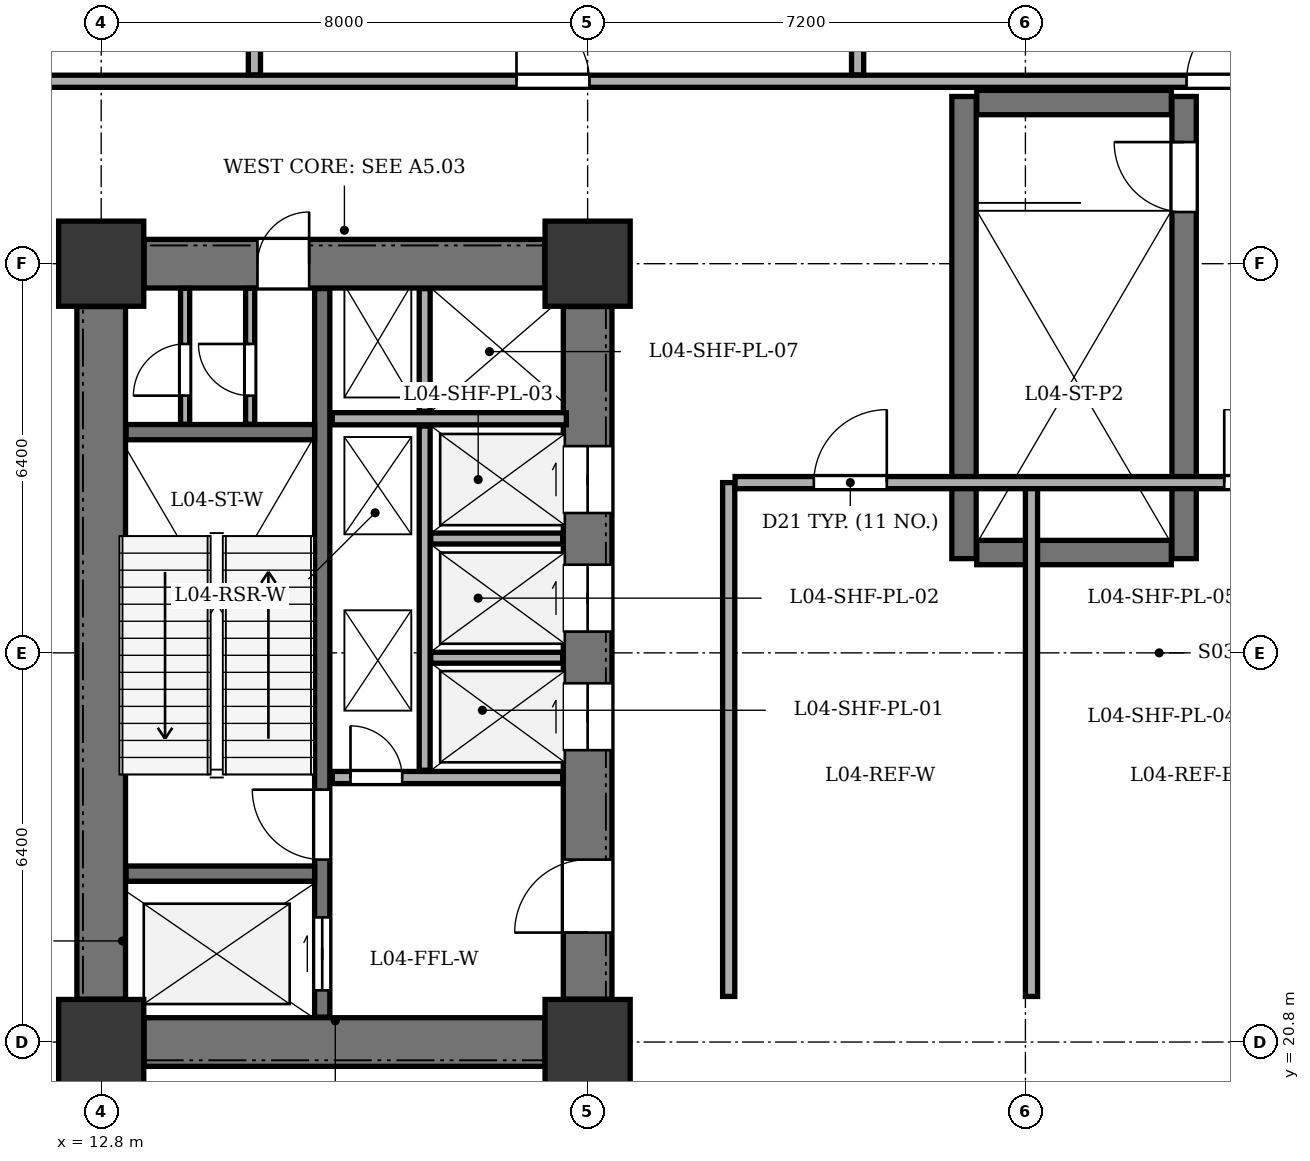
"""IFC4 building model, lengths in metres.
Left out: names, types, materials, properties, quantities, classifications, styles, units other than length and angle.
Written with IfcOpenShell. Run it as: python <this file> out.ifc"""

import sys

from ifc_helpers import new_model, si_unit, direction, frame, frame_2d, origin, origin_2d, place, context, subcontext, project, spatial, rectangle, extrude, element, fill, save


model = new_model("IFC4")
c1 = context("Model", 3, precision=1e-05, world=origin(), true_north=direction((0.0, 1.0)))
c2 = subcontext(c1, "Body", "Model", "MODEL_VIEW")
j1 = project(units=[si_unit("LENGTHUNIT", "METRE"), si_unit("PLANEANGLEUNIT", "RADIAN")], contexts=[c1])
p1 = place(None, origin())
s1 = spatial("IfcSite", under=j1, at=p1, CompositionType="ELEMENT")
p2 = place(p1, origin())
s2 = spatial("IfcBuilding", under=s1, at=p2, CompositionType="ELEMENT")
p3 = place(p2, frame((0.0, 0.0, 18.9)))
s3 = spatial("IfcBuildingStorey", under=s2, at=p3, CompositionType="ELEMENT", Elevation=18.9)
for number, where, z_axis, x_axis in (
    (1, (12.8, 20.8, 0.0), (0.0, 0.0, 1.0), (1.0, 0.0, 0.0)),
    (2, (20.8, 20.8, 0.0), (0.0, 0.0, 1.0), (1.0, 0.0, 0.0)),
    (3, (12.8, 33.6, 0.0), (0.0, 0.0, 1.0), (1.0, 0.0, 0.0)),
    (4, (20.8, 33.6, 0.0), (0.0, 0.0, 1.0), (1.0, 0.0, 0.0)),
):
    element("IfcColumn", number, at=place(p3, frame(where, z_axis=z_axis, x_axis=x_axis)), inside=s3, PredefinedType="COLUMN", context=c2, shape_type="SweptSolid", body=[
        extrude(rectangle(XDim=1.4, YDim=1.4, at=origin_2d()), origin(), (0.0, 0.0, 1.0), 5.4),
    ])
p4 = place(p3, frame((12.8, 21.505, 0.0), z_axis=(0.0, 0.0, 1.0), x_axis=(0.0, 1.0, 0.0)))
e5 = element("IfcWall", 5, at=p4, inside=s3, PredefinedType="SHEAR", context=c2, shape_type="SweptSolid", body=[
    extrude(rectangle(XDim=11.39, YDim=0.8, at=frame_2d((5.695, 0.0))), origin(), (0.0, 0.0, 1.0), 4.95),
])
p5 = place(p3, frame((13.505, 20.8, 0.0), z_axis=(0.0, 0.0, 1.0), x_axis=(1.0, 0.0, 0.0)))
e6 = element("IfcWall", 6, at=p5, inside=s3, PredefinedType="SHEAR", context=c2, shape_type="SweptSolid", body=[
    extrude(rectangle(XDim=6.59, YDim=0.8, at=frame_2d((3.295, 0.0))), origin(), (0.0, 0.0, 1.0), 4.95),
])
p6 = place(p3, frame((13.505, 33.6, 0.0), z_axis=(0.0, 0.0, 1.0), x_axis=(1.0, 0.0, 0.0)))
e7 = element("IfcWall", 7, at=p6, inside=s3, PredefinedType="SHEAR", context=c2, shape_type="SweptSolid", body=[
    extrude(rectangle(XDim=6.59, YDim=0.8, at=frame_2d((3.295, 0.0))), origin(), (0.0, 0.0, 1.0), 4.95),
])
p7 = place(p6, frame((1.865, 0.0, 0.0)))
e8 = element("IfcOpeningElement", 8, at=p7, cuts=e7, PredefinedType="OPENING", context=c2, shape_type="SweptSolid", body=[
    extrude(rectangle(XDim=0.85, YDim=2.02, at=frame_2d((0.425, 1.01))), frame((0.0, 0.41, 0.0), z_axis=(0.0, -1.0, 0.0), x_axis=(1.0, 0.0, 0.0)), (0.0, 0.0, 1.0), 0.82),
])
p8 = place(p3, frame((20.8, 21.505, 0.0), z_axis=(0.0, 0.0, 1.0), x_axis=(0.0, 1.0, 0.0)))
e9 = element("IfcWall", 9, at=p8, inside=s3, PredefinedType="SHEAR", context=c2, shape_type="SweptSolid", body=[
    extrude(rectangle(XDim=11.39, YDim=0.8, at=frame_2d((5.695, 0.0))), origin(), (0.0, 0.0, 1.0), 4.95),
])
p9 = place(p8, frame((1.095, 0.0, 0.0)))
e10 = element("IfcOpeningElement", 10, at=p9, cuts=e9, PredefinedType="OPENING", context=c2, shape_type="SweptSolid", body=[
    extrude(rectangle(XDim=1.2, YDim=2.15, at=frame_2d((0.6, 1.075))), frame((0.0, 0.41, 0.0), z_axis=(0.0, -1.0, 0.0), x_axis=(1.0, 0.0, 0.0)), (0.0, 0.0, 1.0), 0.82),
])
p10 = place(p8, frame((4.095, 0.0, 0.0)))
e11 = element("IfcOpeningElement", 11, at=p10, cuts=e9, PredefinedType="OPENING", context=c2, shape_type="SweptSolid", body=[
    extrude(rectangle(XDim=1.1, YDim=2.1, at=frame_2d((0.55, 1.05))), frame((0.0, 0.41, 0.0), z_axis=(0.0, -1.0, 0.0), x_axis=(1.0, 0.0, 0.0)), (0.0, 0.0, 1.0), 0.82),
])
p11 = place(p8, frame((6.045, 0.0, 0.0)))
e12 = element("IfcOpeningElement", 12, at=p11, cuts=e9, PredefinedType="OPENING", context=c2, shape_type="SweptSolid", body=[
    extrude(rectangle(XDim=1.1, YDim=2.1, at=frame_2d((0.55, 1.05))), frame((0.0, 0.41, 0.0), z_axis=(0.0, -1.0, 0.0), x_axis=(1.0, 0.0, 0.0)), (0.0, 0.0, 1.0), 0.82),
])
p12 = place(p8, frame((7.995, 0.0, 0.0)))
e13 = element("IfcOpeningElement", 13, at=p12, cuts=e9, PredefinedType="OPENING", context=c2, shape_type="SweptSolid", body=[
    extrude(rectangle(XDim=1.1, YDim=2.1, at=frame_2d((0.55, 1.05))), frame((0.0, 0.41, 0.0), z_axis=(0.0, -1.0, 0.0), x_axis=(1.0, 0.0, 0.0)), (0.0, 0.0, 1.0), 0.82),
])
p13 = place(p3, frame((16.435, 21.21, 0.0), z_axis=(0.0, 0.0, 1.0), x_axis=(0.0, 1.0, 0.0)))
e14 = element("IfcWall", 14, at=p13, inside=s3, PredefinedType="SHEAR", context=c2, shape_type="SweptSolid", body=[
    extrude(rectangle(XDim=11.98, YDim=0.25, at=frame_2d((5.99, 0.0))), origin(), (0.0, 0.0, 1.0), 4.95),
])
p14 = place(p13, frame((0.44, 0.0, 0.0)))
e15 = element("IfcOpeningElement", 15, at=p14, cuts=e14, PredefinedType="OPENING", context=c2, shape_type="SweptSolid", body=[
    extrude(rectangle(XDim=1.2, YDim=2.15, at=frame_2d((0.6, 1.075))), frame((0.0, 0.135, 0.0), z_axis=(0.0, -1.0, 0.0), x_axis=(1.0, 0.0, 0.0)), (0.0, 0.0, 1.0), 0.27),
])
p15 = place(p13, frame((2.59, 0.0, 0.0)))
e16 = element("IfcOpeningElement", 16, at=p15, cuts=e14, PredefinedType="OPENING", context=c2, shape_type="SweptSolid", body=[
    extrude(rectangle(XDim=1.15, YDim=2.15, at=frame_2d((0.575, 1.075))), frame((0.0, 0.135, 0.0), z_axis=(0.0, -1.0, 0.0), x_axis=(1.0, 0.0, 0.0)), (0.0, 0.0, 1.0), 0.27),
])
for number, where, z_axis, x_axis in (
    (17, (13.21, 23.57, 0.0), (0.0, 0.0, 1.0), (1.0, 0.0, 0.0)),
    (18, (13.21, 30.83, 0.0), (0.0, 0.0, 1.0), (1.0, 0.0, 0.0)),
):
    element("IfcWall", number, at=place(p3, frame(where, z_axis=z_axis, x_axis=x_axis)), inside=s3, PredefinedType="SHEAR", context=c2, shape_type="SweptSolid", body=[
        extrude(rectangle(XDim=3.1, YDim=0.25, at=frame_2d((1.55, 0.0))), origin(), (0.0, 0.0, 1.0), 4.95),
    ])
p16 = place(p3, frame((16.6, 25.15, 0.0), z_axis=(0.0, 0.0, 1.0), x_axis=(1.0, 0.0, 0.0)))
e19 = element("IfcWall", 19, at=p16, inside=s3, PredefinedType="SOLIDWALL", context=c2, shape_type="SweptSolid", body=[
    extrude(rectangle(XDim=3.79, YDim=0.2, at=frame_2d((1.895, 0.0))), origin(), (0.0, 0.0, 1.0), 4.95),
])
p17 = place(p16, frame((0.3, 0.0, 0.0)))
e20 = element("IfcOpeningElement", 20, at=p17, cuts=e19, PredefinedType="OPENING", context=c2, shape_type="SweptSolid", body=[
    extrude(rectangle(XDim=0.85, YDim=2.02, at=frame_2d((0.425, 1.01))), frame((0.0, 0.11, 0.0), z_axis=(0.0, -1.0, 0.0), x_axis=(1.0, 0.0, 0.0)), (0.0, 0.0, 1.0), 0.22),
])
p18 = place(p3, frame((16.6, 31.05, 0.0), z_axis=(0.0, 0.0, 1.0), x_axis=(1.0, 0.0, 0.0)))
e21 = element("IfcWall", 21, at=p18, inside=s3, PredefinedType="SOLIDWALL", context=c2, shape_type="SweptSolid", body=[
    extrude(rectangle(XDim=3.85, YDim=0.2, at=frame_2d((1.925, 0.0))), origin(), (0.0, 0.0, 1.0), 4.95),
])
p19 = place(p3, frame((18.12, 25.27, 0.0), z_axis=(0.0, 0.0, 1.0), x_axis=(0.0, 1.0, 0.0)))
e22 = element("IfcWall", 22, at=p19, inside=s3, PredefinedType="PARTITIONING", context=c2, shape_type="SweptSolid", body=[
    extrude(rectangle(XDim=5.66, YDim=0.18, at=frame_2d((2.83, 0.0))), origin(), (0.0, 0.0, 1.0), 4.95),
])
p20 = place(p3, frame((18.12, 31.17, 0.0), z_axis=(0.0, 0.0, 1.0), x_axis=(0.0, 1.0, 0.0)))
e23 = element("IfcWall", 23, at=p20, inside=s3, PredefinedType="PARTITIONING", context=c2, shape_type="SweptSolid", body=[
    extrude(rectangle(XDim=2.02, YDim=0.18, at=frame_2d((1.01, 0.0))), origin(), (0.0, 0.0, 1.0), 4.95),
])
for number, where, z_axis, x_axis in (
    (24, (18.22, 27.12, 0.0), (0.0, 0.0, 1.0), (1.0, 0.0, 0.0)),
    (25, (18.22, 29.08, 0.0), (0.0, 0.0, 1.0), (1.0, 0.0, 0.0)),
):
    element("IfcWall", number, at=place(p3, frame(where, z_axis=z_axis, x_axis=x_axis)), inside=s3, PredefinedType="PARTITIONING", context=c2, shape_type="SweptSolid", body=[
        extrude(rectangle(XDim=2.17, YDim=0.18, at=frame_2d((1.085, 0.0))), origin(), (0.0, 0.0, 1.0), 4.95),
    ])
p21 = place(p3, frame((26.99, 28.75, 0.0), z_axis=(0.0, 0.0, 1.0), x_axis=(0.0, 1.0, 0.0)))
e26 = element("IfcWall", 26, at=p21, inside=s3, PredefinedType="SHEAR", context=c2, shape_type="SweptSolid", body=[
    extrude(rectangle(XDim=7.6, YDim=0.4, at=frame_2d((3.8, 0.0))), origin(), (0.0, 0.0, 1.0), 4.95),
])
p22 = place(p3, frame((30.61, 28.75, 0.0), z_axis=(0.0, 0.0, 1.0), x_axis=(0.0, 1.0, 0.0)))
e27 = element("IfcWall", 27, at=p22, inside=s3, PredefinedType="SHEAR", context=c2, shape_type="SweptSolid", body=[
    extrude(rectangle(XDim=7.6, YDim=0.4, at=frame_2d((3.8, 0.0))), origin(), (0.0, 0.0, 1.0), 4.95),
])
p23 = place(p22, frame((5.7, 0.0, 0.0)))
e28 = element("IfcOpeningElement", 28, at=p23, cuts=e27, PredefinedType="OPENING", context=c2, shape_type="SweptSolid", body=[
    extrude(rectangle(XDim=1.15, YDim=2.15, at=frame_2d((0.575, 1.075))), frame((0.0, 0.21, 0.0), z_axis=(0.0, -1.0, 0.0), x_axis=(1.0, 0.0, 0.0)), (0.0, 0.0, 1.0), 0.42),
])
for number, where, z_axis, x_axis in (
    (29, (27.2, 28.85, 0.0), (0.0, 0.0, 1.0), (1.0, 0.0, 0.0)),
    (30, (27.2, 36.25, 0.0), (0.0, 0.0, 1.0), (1.0, 0.0, 0.0)),
):
    element("IfcWall", number, at=place(p3, frame(where, z_axis=z_axis, x_axis=x_axis)), inside=s3, PredefinedType="SHEAR", context=c2, shape_type="SweptSolid", body=[
        extrude(rectangle(XDim=3.2, YDim=0.4, at=frame_2d((1.6, 0.0))), origin(), (0.0, 0.0, 1.0), 4.95),
    ])
p24 = place(p3, frame((14.18, 30.96, 0.0), z_axis=(0.0, 0.0, 1.0), x_axis=(0.0, 1.0, 0.0)))
e31 = element("IfcWall", 31, at=p24, inside=s3, PredefinedType="PARTITIONING", context=c2, shape_type="SweptSolid", body=[
    extrude(rectangle(XDim=2.235, YDim=0.15, at=frame_2d((1.118, 0.0))), origin(), (0.0, 0.0, 1.0), 4.95),
])
p25 = place(p24, frame((0.47, 0.0, 0.0)))
e32 = element("IfcOpeningElement", 32, at=p25, cuts=e31, PredefinedType="OPENING", context=c2, shape_type="SweptSolid", body=[
    extrude(rectangle(XDim=0.85, YDim=2.02, at=frame_2d((0.425, 1.01))), frame((0.0, 0.085, 0.0), z_axis=(0.0, -1.0, 0.0), x_axis=(1.0, 0.0, 0.0)), (0.0, 0.0, 1.0), 0.17),
])
p26 = place(p3, frame((15.25, 30.96, 0.0), z_axis=(0.0, 0.0, 1.0), x_axis=(0.0, 1.0, 0.0)))
e33 = element("IfcWall", 33, at=p26, inside=s3, PredefinedType="PARTITIONING", context=c2, shape_type="SweptSolid", body=[
    extrude(rectangle(XDim=2.235, YDim=0.15, at=frame_2d((1.118, 0.0))), origin(), (0.0, 0.0, 1.0), 4.95),
])
p27 = place(p26, frame((0.47, 0.0, 0.0)))
e34 = element("IfcOpeningElement", 34, at=p27, cuts=e33, PredefinedType="OPENING", context=c2, shape_type="SweptSolid", body=[
    extrude(rectangle(XDim=0.85, YDim=2.02, at=frame_2d((0.425, 1.01))), frame((0.0, 0.085, 0.0), z_axis=(0.0, -1.0, 0.0), x_axis=(1.0, 0.0, 0.0)), (0.0, 0.0, 1.0), 0.17),
])
p28 = place(p3, frame((5.4, 36.6, 0.0), z_axis=(0.0, 0.0, 1.0), x_axis=(1.0, 0.0, 0.0)))
e35 = element("IfcWall", 35, at=p28, inside=s3, PredefinedType="SOLIDWALL", context=c2, shape_type="SweptSolid", body=[
    extrude(rectangle(XDim=49.6, YDim=0.2, at=frame_2d((24.8, 0.0))), origin(), (0.0, 0.0, 1.0), 4.95),
])
p29 = place(p28, frame((4.31, 0.0, 0.0)))
e36 = element("IfcOpeningElement", 36, at=p29, cuts=e35, PredefinedType="OPENING", context=c2, shape_type="SweptSolid", body=[
    extrude(rectangle(XDim=1.2, YDim=2.15, at=frame_2d((0.6, 1.075))), frame((0.0, 0.11, 0.0), z_axis=(0.0, -1.0, 0.0), x_axis=(1.0, 0.0, 0.0)), (0.0, 0.0, 1.0), 0.22),
])
p30 = place(p28, frame((14.23, 0.0, 0.0)))
e37 = element("IfcOpeningElement", 37, at=p30, cuts=e35, PredefinedType="OPENING", context=c2, shape_type="SweptSolid", body=[
    extrude(rectangle(XDim=1.2, YDim=2.15, at=frame_2d((0.6, 1.075))), frame((0.0, 0.11, 0.0), z_axis=(0.0, -1.0, 0.0), x_axis=(1.0, 0.0, 0.0)), (0.0, 0.0, 1.0), 0.22),
])
p31 = place(p28, frame((25.25, 0.0, 0.0)))
e38 = element("IfcOpeningElement", 38, at=p31, cuts=e35, PredefinedType="OPENING", context=c2, shape_type="SweptSolid", body=[
    extrude(rectangle(XDim=1.2, YDim=2.15, at=frame_2d((0.6, 1.075))), frame((0.0, 0.11, 0.0), z_axis=(0.0, -1.0, 0.0), x_axis=(1.0, 0.0, 0.0)), (0.0, 0.0, 1.0), 0.22),
])
p32 = place(p28, frame((34.07, 0.0, 0.0)))
e39 = element("IfcOpeningElement", 39, at=p32, cuts=e35, PredefinedType="OPENING", context=c2, shape_type="SweptSolid", body=[
    extrude(rectangle(XDim=1.2, YDim=2.15, at=frame_2d((0.6, 1.075))), frame((0.0, 0.11, 0.0), z_axis=(0.0, -1.0, 0.0), x_axis=(1.0, 0.0, 0.0)), (0.0, 0.0, 1.0), 0.22),
])
p33 = place(p28, frame((43.99, 0.0, 0.0)))
e40 = element("IfcOpeningElement", 40, at=p33, cuts=e35, PredefinedType="OPENING", context=c2, shape_type="SweptSolid", body=[
    extrude(rectangle(XDim=1.2, YDim=2.15, at=frame_2d((0.6, 1.075))), frame((0.0, 0.11, 0.0), z_axis=(0.0, -1.0, 0.0), x_axis=(1.0, 0.0, 0.0)), (0.0, 0.0, 1.0), 0.22),
])
p34 = place(p3, frame((23.12, 21.55, 0.0), z_axis=(0.0, 0.0, 1.0), x_axis=(0.0, 1.0, 0.0)))
e41 = element("IfcWall", 41, at=p34, inside=s3, PredefinedType="SOLIDWALL", context=c2, shape_type="SweptSolid", body=[
    extrude(rectangle(XDim=8.45, YDim=0.2, at=frame_2d((4.225, 0.0))), origin(), (0.0, 0.0, 1.0), 4.95),
])
p35 = place(p3, frame((28.1, 21.55, 0.0), z_axis=(0.0, 0.0, 1.0), x_axis=(0.0, 1.0, 0.0)))
e42 = element("IfcWall", 42, at=p35, inside=s3, PredefinedType="SOLIDWALL", context=c2, shape_type="SweptSolid", body=[
    extrude(rectangle(XDim=8.45, YDim=0.2, at=frame_2d((4.225, 0.0))), origin(), (0.0, 0.0, 1.0), 4.035),
])
p36 = place(p3, frame((23.225, 30.0, 0.0), z_axis=(0.0, 0.0, 1.0), x_axis=(1.0, 0.0, 0.0)))
e43 = element("IfcWall", 43, at=p36, inside=s3, PredefinedType="SOLIDWALL", context=c2, shape_type="SweptSolid", body=[
    extrude(rectangle(XDim=9.75, YDim=0.2, at=frame_2d((4.875, 0.0))), origin(), (0.0, 0.0, 1.0), 4.95),
])
p37 = place(p36, frame((1.295, 0.0, 0.0)))
e44 = element("IfcOpeningElement", 44, at=p37, cuts=e43, PredefinedType="OPENING", context=c2, shape_type="SweptSolid", body=[
    extrude(rectangle(XDim=1.2, YDim=2.15, at=frame_2d((0.6, 1.075))), frame((0.0, 0.11, 0.0), z_axis=(0.0, -1.0, 0.0), x_axis=(1.0, 0.0, 0.0)), (0.0, 0.0, 1.0), 0.22),
])
p38 = place(p36, frame((8.045, 0.0, 0.0)))
e45 = element("IfcOpeningElement", 45, at=p38, cuts=e43, PredefinedType="OPENING", context=c2, shape_type="SweptSolid", body=[
    extrude(rectangle(XDim=1.2, YDim=2.15, at=frame_2d((0.6, 1.075))), frame((0.0, 0.11, 0.0), z_axis=(0.0, -1.0, 0.0), x_axis=(1.0, 0.0, 0.0)), (0.0, 0.0, 1.0), 0.22),
])
for number, where, z_axis, x_axis in (
    (46, (15.32, 36.705, 0.0), (0.0, 0.0, 1.0), (0.0, 1.0, 0.0)),
    (47, (25.24, 36.705, 0.0), (0.0, 0.0, 1.0), (0.0, 1.0, 0.0)),
):
    element("IfcWall", number, at=place(p3, frame(where, z_axis=z_axis, x_axis=x_axis)), inside=s3, PredefinedType="SOLIDWALL", context=c2, shape_type="SweptSolid", body=[
        extrude(rectangle(XDim=15.79, YDim=0.2, at=frame_2d((7.895, 0.0))), origin(), (0.0, 0.0, 1.0), 4.95),
    ])
p39 = place(p7, origin())
e48 = element("IfcDoor", 48, at=p39, inside=s3, OperationType="SINGLE_SWING_RIGHT", PredefinedType="DOOR", context=c2, shape_type="SweptSolid", body=[
    extrude(rectangle(XDim=0.85, YDim=2.02, at=frame_2d((0.425, 1.01))), frame((0.0, 0.025, 0.0), z_axis=(0.0, -1.0, 0.0), x_axis=(1.0, 0.0, 0.0)), (0.0, 0.0, 1.0), 0.05),
])
fill(e8, e48)
p40 = place(p9, origin())
e49 = element("IfcDoor", 49, at=p40, inside=s3, OperationType="SINGLE_SWING_LEFT", PredefinedType="DOOR", context=c2, shape_type="SweptSolid", body=[
    extrude(rectangle(XDim=1.2, YDim=2.15, at=frame_2d((0.6, 1.075))), frame((0.0, 0.025, 0.0), z_axis=(0.0, -1.0, 0.0), x_axis=(1.0, 0.0, 0.0)), (0.0, 0.0, 1.0), 0.05),
])
fill(e10, e49)
p41 = place(p10, origin())
e50 = element("IfcDoor", 50, at=p41, inside=s3, OperationType="DOUBLE_DOOR_SLIDING", PredefinedType="DOOR", context=c2, shape_type="SweptSolid", body=[
    extrude(rectangle(XDim=1.1, YDim=2.1, at=frame_2d((0.55, 1.05))), frame((0.0, 0.025, 0.0), z_axis=(0.0, -1.0, 0.0), x_axis=(1.0, 0.0, 0.0)), (0.0, 0.0, 1.0), 0.05),
])
fill(e11, e50)
p42 = place(p11, origin())
e51 = element("IfcDoor", 51, at=p42, inside=s3, OperationType="DOUBLE_DOOR_SLIDING", PredefinedType="DOOR", context=c2, shape_type="SweptSolid", body=[
    extrude(rectangle(XDim=1.1, YDim=2.1, at=frame_2d((0.55, 1.05))), frame((0.0, 0.025, 0.0), z_axis=(0.0, -1.0, 0.0), x_axis=(1.0, 0.0, 0.0)), (0.0, 0.0, 1.0), 0.05),
])
fill(e12, e51)
p43 = place(p12, origin())
e52 = element("IfcDoor", 52, at=p43, inside=s3, OperationType="DOUBLE_DOOR_SLIDING", PredefinedType="DOOR", context=c2, shape_type="SweptSolid", body=[
    extrude(rectangle(XDim=1.1, YDim=2.1, at=frame_2d((0.55, 1.05))), frame((0.0, 0.025, 0.0), z_axis=(0.0, -1.0, 0.0), x_axis=(1.0, 0.0, 0.0)), (0.0, 0.0, 1.0), 0.05),
])
fill(e13, e52)
p44 = place(p14, origin())
e53 = element("IfcDoor", 53, at=p44, inside=s3, OperationType="DOUBLE_DOOR_SLIDING", PredefinedType="DOOR", context=c2, shape_type="SweptSolid", body=[
    extrude(rectangle(XDim=1.2, YDim=2.15, at=frame_2d((0.6, 1.075))), frame((0.0, 0.025, 0.0), z_axis=(0.0, -1.0, 0.0), x_axis=(1.0, 0.0, 0.0)), (0.0, 0.0, 1.0), 0.05),
])
fill(e15, e53)
p45 = place(p15, origin())
e54 = element("IfcDoor", 54, at=p45, inside=s3, OperationType="SINGLE_SWING_RIGHT", PredefinedType="DOOR", context=c2, shape_type="SweptSolid", body=[
    extrude(rectangle(XDim=1.15, YDim=2.15, at=frame_2d((0.575, 1.075))), frame((0.0, 0.025, 0.0), z_axis=(0.0, -1.0, 0.0), x_axis=(1.0, 0.0, 0.0)), (0.0, 0.0, 1.0), 0.05),
])
fill(e16, e54)
p46 = place(p17, origin())
e55 = element("IfcDoor", 55, at=p46, inside=s3, OperationType="SINGLE_SWING_LEFT", PredefinedType="DOOR", context=c2, shape_type="SweptSolid", body=[
    extrude(rectangle(XDim=0.85, YDim=2.02, at=frame_2d((0.425, 1.01))), frame((0.0, 0.025, 0.0), z_axis=(0.0, -1.0, 0.0), x_axis=(1.0, 0.0, 0.0)), (0.0, 0.0, 1.0), 0.05),
])
fill(e20, e55)
p47 = place(p23, origin())
e56 = element("IfcDoor", 56, at=p47, inside=s3, OperationType="SINGLE_SWING_RIGHT", PredefinedType="DOOR", context=c2, shape_type="SweptSolid", body=[
    extrude(rectangle(XDim=1.15, YDim=2.15, at=frame_2d((0.575, 1.075))), frame((0.0, 0.025, 0.0), z_axis=(0.0, -1.0, 0.0), x_axis=(1.0, 0.0, 0.0)), (0.0, 0.0, 1.0), 0.05),
])
fill(e28, e56)
p48 = place(p25, origin())
e57 = element("IfcDoor", 57, at=p48, inside=s3, OperationType="SINGLE_SWING_LEFT", PredefinedType="DOOR", context=c2, shape_type="SweptSolid", body=[
    extrude(rectangle(XDim=0.85, YDim=2.02, at=frame_2d((0.425, 1.01))), frame((0.0, 0.025, 0.0), z_axis=(0.0, -1.0, 0.0), x_axis=(1.0, 0.0, 0.0)), (0.0, 0.0, 1.0), 0.05),
])
fill(e32, e57)
p49 = place(p27, origin())
e58 = element("IfcDoor", 58, at=p49, inside=s3, OperationType="SINGLE_SWING_RIGHT", PredefinedType="DOOR", context=c2, shape_type="SweptSolid", body=[
    extrude(rectangle(XDim=0.85, YDim=2.02, at=frame_2d((0.425, 1.01))), frame((0.0, 0.025, 0.0), z_axis=(0.0, -1.0, 0.0), x_axis=(1.0, 0.0, 0.0)), (0.0, 0.0, 1.0), 0.05),
])
fill(e34, e58)
p50 = place(p37, origin())
e59 = element("IfcDoor", 59, at=p50, inside=s3, OperationType="SINGLE_SWING_RIGHT", PredefinedType="DOOR", context=c2, shape_type="SweptSolid", body=[
    extrude(rectangle(XDim=1.2, YDim=2.15, at=frame_2d((0.6, 1.075))), frame((0.0, 0.025, 0.0), z_axis=(0.0, -1.0, 0.0), x_axis=(1.0, 0.0, 0.0)), (0.0, 0.0, 1.0), 0.05),
])
fill(e44, e59)
p51 = place(p38, origin())
e60 = element("IfcDoor", 60, at=p51, inside=s3, OperationType="SINGLE_SWING_LEFT", PredefinedType="DOOR", context=c2, shape_type="SweptSolid", body=[
    extrude(rectangle(XDim=1.2, YDim=2.15, at=frame_2d((0.6, 1.075))), frame((0.0, 0.025, 0.0), z_axis=(0.0, -1.0, 0.0), x_axis=(1.0, 0.0, 0.0)), (0.0, 0.0, 1.0), 0.05),
])
fill(e45, e60)
p52 = place(p30, origin())
e61 = element("IfcDoor", 61, at=p52, inside=s3, OperationType="SINGLE_SWING_LEFT", PredefinedType="DOOR", context=c2, shape_type="SweptSolid", body=[
    extrude(rectangle(XDim=1.2, YDim=2.15, at=frame_2d((0.6, 1.075))), frame((0.0, 0.025, 0.0), z_axis=(0.0, -1.0, 0.0), x_axis=(1.0, 0.0, 0.0)), (0.0, 0.0, 1.0), 0.05),
])
fill(e37, e61)
p53 = place(p31, origin())
e62 = element("IfcDoor", 62, at=p53, inside=s3, OperationType="SINGLE_SWING_RIGHT", PredefinedType="DOOR", context=c2, shape_type="SweptSolid", body=[
    extrude(rectangle(XDim=1.2, YDim=2.15, at=frame_2d((0.6, 1.075))), frame((0.0, 0.025, 0.0), z_axis=(0.0, -1.0, 0.0), x_axis=(1.0, 0.0, 0.0)), (0.0, 0.0, 1.0), 0.05),
])
fill(e38, e62)
save(model, sys.argv[1])
